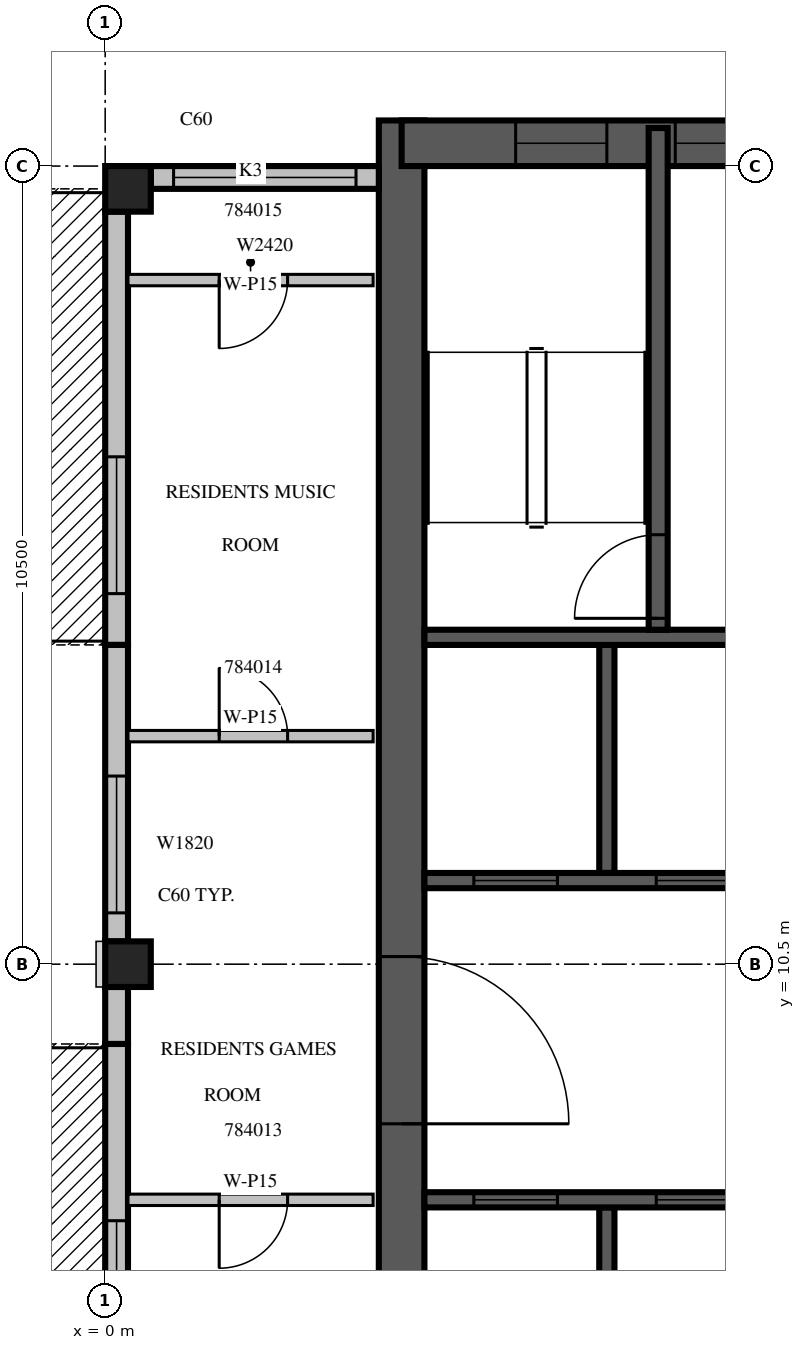
"""IFC4 building model, lengths in metres.
Left out: names, types, materials, properties, quantities, classifications, styles, units other than length and angle.
Written with IfcOpenShell. Run it as: python <this file> out.ifc"""

import sys

from ifc_helpers import new_model, si_unit, direction, frame, frame_2d, origin, origin_2d, place, context, subcontext, project, spatial, rectangle, extrude, source, transform, mapped, element, fill, save


model = new_model("IFC4")
c1 = context("Model", 3, precision=1e-05, world=origin(), true_north=direction((0.0, 1.0)))
c2 = subcontext(c1, "Body", "Model", "MODEL_VIEW")
j1 = project(units=[si_unit("LENGTHUNIT", "METRE"), si_unit("PLANEANGLEUNIT", "RADIAN")], contexts=[c1])
p1 = place(None, origin())
s1 = spatial("IfcSite", under=j1, at=p1, CompositionType="ELEMENT")
p2 = place(p1, origin())
s2 = spatial("IfcBuilding", under=s1, at=p2, CompositionType="ELEMENT")
p3 = place(p2, frame((0.0, 0.0, 354.5)))
s3 = spatial("IfcBuildingStorey", under=s2, at=p3, CompositionType="ELEMENT", Elevation=354.5)
m1 = source(origin(), c2, "Body", "SweptSolid", [
    extrude(rectangle(XDim=0.6, YDim=0.6, at=origin_2d()), origin(), (0.0, 0.0, 1.0), 3.5),
])
for number, where, z_axis, x_axis in (
    (1, (0.3, 10.5, 0.0), (0.0, 0.0, 1.0), (1.0, 0.0, 0.0)),
    (2, (0.3, 20.7, 0.0), (0.0, 0.0, 1.0), (1.0, 0.0, 0.0)),
):
    element("IfcColumn", number, at=place(p3, frame(where, z_axis=z_axis, x_axis=x_axis)), inside=s3, PredefinedType="COLUMN", context=c2, shape_type="MappedRepresentation", body=[
        mapped(m1, transform((0.0, 0.0, 0.0), scale=1.0)),
    ])
m2 = source(origin(), c2, "Body", "SweptSolid", [
    extrude(rectangle(XDim=17.4, YDim=0.6, at=frame_2d((8.7, 0.0))), origin(), (0.0, 0.0, 1.0), 3.5),
])
p4 = place(p3, frame((3.9, 4.2, 0.0), z_axis=(0.0, 0.0, 1.0), x_axis=(0.0, 1.0, 0.0)))
e3 = element("IfcWall", 3, at=p4, inside=s3, PredefinedType="SHEAR", context=c2, shape_type="MappedRepresentation", body=[
    mapped(m2, transform((0.0, 0.0, 0.0), scale=1.0)),
])
m3 = source(origin(), c2, "Body", "SweptSolid", [
    extrude(rectangle(XDim=2.2, YDim=2.1, at=frame_2d((1.1, 1.05))), frame((0.0, 0.31, 0.0), z_axis=(0.0, -1.0, 0.0), x_axis=(1.0, 0.0, 0.0)), (0.0, 0.0, 1.0), 0.62),
])
p5 = place(p4, frame((4.2, 0.0, 0.0)))
e4 = element("IfcOpeningElement", 4, at=p5, cuts=e3, PredefinedType="OPENING", context=c2, shape_type="MappedRepresentation", body=[
    mapped(m3, transform((0.0, 0.0, 0.0), scale=1.0)),
])
m4 = source(origin(), c2, "Body", "SweptSolid", [
    extrude(rectangle(XDim=6.6, YDim=0.6, at=frame_2d((3.3, 0.0))), origin(), (0.0, 0.0, 1.0), 3.5),
])
p6 = place(p3, frame((3.9, 21.3, 0.0), z_axis=(0.0, 0.0, 1.0), x_axis=(1.0, 0.0, 0.0)))
e5 = element("IfcWall", 5, at=p6, inside=s3, PredefinedType="SHEAR", context=c2, shape_type="MappedRepresentation", body=[
    mapped(m4, transform((0.0, 0.0, 0.0), scale=1.0)),
])
m5 = source(origin(), c2, "Body", "SweptSolid", [
    extrude(rectangle(XDim=1.2, YDim=2.4, at=frame_2d((0.6, 1.2))), frame((0.0, 0.31, 0.0), z_axis=(0.0, -1.0, 0.0), x_axis=(1.0, 0.0, 0.0)), (0.0, 0.0, 1.0), 0.62),
])
p7 = place(p6, frame((1.5, 0.0, 0.6)))
e6 = element("IfcOpeningElement", 6, at=p7, cuts=e5, PredefinedType="OPENING", context=c2, shape_type="MappedRepresentation", body=[
    mapped(m5, transform((0.0, 0.0, 0.0), scale=1.0)),
])
p8 = place(p6, frame((3.6, 0.0, 0.6)))
e7 = element("IfcOpeningElement", 7, at=p8, cuts=e5, PredefinedType="OPENING", context=c2, shape_type="MappedRepresentation", body=[
    mapped(m5, transform((0.0, 0.0, 0.0), scale=1.0)),
])
m6 = source(origin(), c2, "Body", "SweptSolid", [
    extrude(rectangle(XDim=3.0, YDim=0.3, at=frame_2d((1.5, 0.0))), origin(), (0.0, 0.0, 1.0), 3.1),
])
p9 = place(p3, frame((3.6, 20.85, 0.0), z_axis=(0.0, 0.0, 1.0), x_axis=(-1.0, 0.0, 0.0)))
e8 = element("IfcWall", 8, at=p9, inside=s3, PredefinedType="STANDARD", context=c2, shape_type="MappedRepresentation", body=[
    mapped(m6, transform((0.0, 0.0, 0.0), scale=1.0)),
])
m7 = source(origin(), c2, "Body", "SweptSolid", [
    extrude(rectangle(XDim=2.4, YDim=2.0, at=frame_2d((1.2, 1.0))), frame((0.0, 0.16, 0.0), z_axis=(0.0, -1.0, 0.0), x_axis=(1.0, 0.0, 0.0)), (0.0, 0.0, 1.0), 0.32),
])
p10 = place(p9, frame((0.3, 0.0, 0.6)))
e9 = element("IfcOpeningElement", 9, at=p10, cuts=e8, PredefinedType="OPENING", context=c2, shape_type="MappedRepresentation", body=[
    mapped(m7, transform((0.0, 0.0, 0.0), scale=1.0)),
])
m8 = source(origin(), c2, "Body", "SweptSolid", [
    extrude(rectangle(XDim=5.7, YDim=0.3, at=frame_2d((2.85, 0.0))), origin(), (0.0, 0.0, 1.0), 3.1),
])
p11 = place(p3, frame((0.15, 20.4, 0.0), z_axis=(0.0, 0.0, 1.0), x_axis=(0.0, -1.0, 0.0)))
e10 = element("IfcWall", 10, at=p11, inside=s3, PredefinedType="STANDARD", context=c2, shape_type="MappedRepresentation", body=[
    mapped(m8, transform((0.0, 0.0, 0.0), scale=1.0)),
])
m9 = source(origin(), c2, "Body", "SweptSolid", [
    extrude(rectangle(XDim=1.8, YDim=2.4, at=frame_2d((0.9, 1.2))), frame((0.0, 0.16, 0.0), z_axis=(0.0, -1.0, 0.0), x_axis=(1.0, 0.0, 0.0)), (0.0, 0.0, 1.0), 0.32),
])
p12 = place(p11, frame((3.225, 0.0, 0.0)))
e11 = element("IfcOpeningElement", 11, at=p12, cuts=e10, PredefinedType="OPENING", context=c2, shape_type="MappedRepresentation", body=[
    mapped(m9, transform((0.0, 0.0, 0.0), scale=1.0)),
])
m10 = source(origin(), c2, "Body", "SweptSolid", [
    extrude(rectangle(XDim=3.9, YDim=0.3, at=frame_2d((1.95, 0.0))), origin(), (0.0, 0.0, 1.0), 3.1),
])
p13 = place(p3, frame((0.15, 14.7, 0.0), z_axis=(0.0, 0.0, 1.0), x_axis=(0.0, -1.0, 0.0)))
e12 = element("IfcWall", 12, at=p13, inside=s3, PredefinedType="STANDARD", context=c2, shape_type="MappedRepresentation", body=[
    mapped(m10, transform((0.0, 0.0, 0.0), scale=1.0)),
])
m11 = source(origin(), c2, "Body", "SweptSolid", [
    extrude(rectangle(XDim=1.8, YDim=2.0, at=frame_2d((0.9, 1.0))), frame((0.0, 0.16, 0.0), z_axis=(0.0, -1.0, 0.0), x_axis=(1.0, 0.0, 0.0)), (0.0, 0.0, 1.0), 0.32),
])
p14 = place(p13, frame((1.725, 0.0, 0.6)))
e13 = element("IfcOpeningElement", 13, at=p14, cuts=e12, PredefinedType="OPENING", context=c2, shape_type="MappedRepresentation", body=[
    mapped(m11, transform((0.0, 0.0, 0.0), scale=1.0)),
])
m12 = source(origin(), c2, "Body", "SweptSolid", [
    extrude(rectangle(XDim=0.75, YDim=0.3, at=frame_2d((0.375, 0.0))), origin(), (0.0, 0.0, 1.0), 3.1),
])
p15 = place(p3, frame((0.15, 10.2, 0.0), z_axis=(0.0, 0.0, 1.0), x_axis=(0.0, -1.0, 0.0)))
e14 = element("IfcWall", 14, at=p15, inside=s3, PredefinedType="STANDARD", context=c2, shape_type="MappedRepresentation", body=[
    mapped(m12, transform((0.0, 0.0, 0.0), scale=1.0)),
])
m13 = source(origin(), c2, "Body", "SweptSolid", [
    extrude(rectangle(XDim=5.25, YDim=0.3, at=frame_2d((2.625, 0.0))), origin(), (0.0, 0.0, 1.0), 3.1),
])
p16 = place(p3, frame((0.15, 9.45, 0.0), z_axis=(0.0, 0.0, 1.0), x_axis=(0.0, -1.0, 0.0)))
e15 = element("IfcWall", 15, at=p16, inside=s3, PredefinedType="STANDARD", context=c2, shape_type="MappedRepresentation", body=[
    mapped(m13, transform((0.0, 0.0, 0.0), scale=1.0)),
])
p17 = place(p16, frame((2.325, 0.0, 0.0)))
e16 = element("IfcOpeningElement", 16, at=p17, cuts=e15, PredefinedType="OPENING", context=c2, shape_type="MappedRepresentation", body=[
    mapped(m9, transform((0.0, 0.0, 0.0), scale=1.0)),
])
m14 = source(origin(), c2, "Body", "SweptSolid", [
    extrude(rectangle(XDim=3.1, YDim=0.2, at=frame_2d((1.55, 0.0))), origin(), (0.0, 0.0, 1.0), 3.5),
])
p18 = place(p3, frame((6.6, 4.2, 0.0), z_axis=(0.0, 0.0, 1.0), x_axis=(0.0, 1.0, 0.0)))
e17 = element("IfcWall", 17, at=p18, inside=s3, PredefinedType="SOLIDWALL", context=c2, shape_type="MappedRepresentation", body=[
    mapped(m14, transform((0.0, 0.0, 0.0), scale=1.0)),
])
m15 = source(origin(), c2, "Body", "SweptSolid", [
    extrude(rectangle(XDim=3.0, YDim=0.2, at=frame_2d((1.5, 0.0))), origin(), (0.0, 0.0, 1.0), 3.5),
])
p19 = place(p3, frame((6.6, 11.7, 0.0), z_axis=(0.0, 0.0, 1.0), x_axis=(0.0, 1.0, 0.0)))
e18 = element("IfcWall", 18, at=p19, inside=s3, PredefinedType="SOLIDWALL", context=c2, shape_type="MappedRepresentation", body=[
    mapped(m15, transform((0.0, 0.0, 0.0), scale=1.0)),
])
m16 = source(origin(), c2, "Body", "SweptSolid", [
    extrude(rectangle(XDim=9.6, YDim=0.2, at=frame_2d((4.8, 0.0))), origin(), (0.0, 0.0, 1.0), 3.5),
])
p20 = place(p3, frame((4.2, 7.4, 0.0), z_axis=(0.0, 0.0, 1.0), x_axis=(1.0, 0.0, 0.0)))
e19 = element("IfcWall", 19, at=p20, inside=s3, PredefinedType="SOLIDWALL", context=c2, shape_type="MappedRepresentation", body=[
    mapped(m16, transform((0.0, 0.0, 0.0), scale=1.0)),
])
m17 = source(origin(), c2, "Body", "SweptSolid", [
    extrude(rectangle(XDim=1.1, YDim=2.1, at=frame_2d((0.55, 1.05))), frame((0.0, 0.11, 0.0), z_axis=(0.0, -1.0, 0.0), x_axis=(1.0, 0.0, 0.0)), (0.0, 0.0, 1.0), 0.22),
])
p21 = place(p20, frame((0.65, 0.0, 0.0)))
e20 = element("IfcOpeningElement", 20, at=p21, cuts=e19, PredefinedType="OPENING", context=c2, shape_type="MappedRepresentation", body=[
    mapped(m17, transform((0.0, 0.0, 0.0), scale=1.0)),
])
p22 = place(p20, frame((3.05, 0.0, 0.0)))
e21 = element("IfcOpeningElement", 21, at=p22, cuts=e19, PredefinedType="OPENING", context=c2, shape_type="MappedRepresentation", body=[
    mapped(m17, transform((0.0, 0.0, 0.0), scale=1.0)),
])
p23 = place(p20, frame((5.45, 0.0, 0.0)))
e22 = element("IfcOpeningElement", 22, at=p23, cuts=e19, PredefinedType="OPENING", context=c2, shape_type="MappedRepresentation", body=[
    mapped(m17, transform((0.0, 0.0, 0.0), scale=1.0)),
])
p24 = place(p20, frame((7.85, 0.0, 0.0)))
e23 = element("IfcOpeningElement", 23, at=p24, cuts=e19, PredefinedType="OPENING", context=c2, shape_type="MappedRepresentation", body=[
    mapped(m17, transform((0.0, 0.0, 0.0), scale=1.0)),
])
m18 = source(origin(), c2, "Body", "SweptSolid", [
    extrude(rectangle(XDim=4.8, YDim=0.2, at=frame_2d((2.4, 0.0))), origin(), (0.0, 0.0, 1.0), 3.5),
])
p25 = place(p3, frame((4.2, 11.6, 0.0), z_axis=(0.0, 0.0, 1.0), x_axis=(1.0, 0.0, 0.0)))
e24 = element("IfcWall", 24, at=p25, inside=s3, PredefinedType="SOLIDWALL", context=c2, shape_type="MappedRepresentation", body=[
    mapped(m18, transform((0.0, 0.0, 0.0), scale=1.0)),
])
p26 = place(p25, frame((0.65, 0.0, 0.0)))
e25 = element("IfcOpeningElement", 25, at=p26, cuts=e24, PredefinedType="OPENING", context=c2, shape_type="MappedRepresentation", body=[
    mapped(m17, transform((0.0, 0.0, 0.0), scale=1.0)),
])
p27 = place(p25, frame((3.05, 0.0, 0.0)))
e26 = element("IfcOpeningElement", 26, at=p27, cuts=e24, PredefinedType="OPENING", context=c2, shape_type="MappedRepresentation", body=[
    mapped(m17, transform((0.0, 0.0, 0.0), scale=1.0)),
])
p28 = place(p3, frame((4.2, 14.8, 0.0), z_axis=(0.0, 0.0, 1.0), x_axis=(1.0, 0.0, 0.0)))
e27 = element("IfcWall", 27, at=p28, inside=s3, PredefinedType="SOLIDWALL", context=c2, shape_type="MappedRepresentation", body=[
    mapped(m18, transform((0.0, 0.0, 0.0), scale=1.0)),
])
m19 = source(origin(), c2, "Body", "SweptSolid", [
    extrude(rectangle(XDim=6.6, YDim=0.25, at=frame_2d((3.3, 0.0))), origin(), (0.0, 0.0, 1.0), 3.1),
])
p29 = place(p3, frame((7.275, 14.9, 0.0), z_axis=(0.0, 0.0, 1.0), x_axis=(0.0, 1.0, 0.0)))
e28 = element("IfcWall", 28, at=p29, inside=s3, PredefinedType="SOLIDWALL", context=c2, shape_type="MappedRepresentation", body=[
    mapped(m19, transform((0.0, 0.0, 0.0), scale=1.0)),
])
m20 = source(origin(), c2, "Body", "SweptSolid", [
    extrude(rectangle(XDim=1.1, YDim=2.1, at=frame_2d((0.55, 1.05))), frame((0.0, 0.135, 0.0), z_axis=(0.0, -1.0, 0.0), x_axis=(1.0, 0.0, 0.0)), (0.0, 0.0, 1.0), 0.27),
])
p30 = place(p29, frame((0.15, 0.0, 0.0)))
e29 = element("IfcOpeningElement", 29, at=p30, cuts=e28, PredefinedType="OPENING", context=c2, shape_type="MappedRepresentation", body=[
    mapped(m20, transform((0.0, 0.0, 0.0), scale=1.0)),
])
m21 = source(origin(), c2, "Body", "SweptSolid", [
    extrude(rectangle(XDim=3.225, YDim=0.15, at=frame_2d((1.613, 0.0))), origin(), (0.0, 0.0, 1.0), 3.1),
])
p31 = place(p3, frame((0.3, 7.4, 0.0), z_axis=(0.0, 0.0, 1.0), x_axis=(1.0, 0.0, 0.0)))
e30 = element("IfcWall", 30, at=p31, inside=s3, PredefinedType="PARTITIONING", context=c2, shape_type="MappedRepresentation", body=[
    mapped(m21, transform((0.0, 0.0, 0.0), scale=1.0)),
])
m22 = source(origin(), c2, "Body", "SweptSolid", [
    extrude(rectangle(XDim=0.9, YDim=2.1, at=frame_2d((0.45, 1.05))), frame((0.0, 0.085, 0.0), z_axis=(0.0, -1.0, 0.0), x_axis=(1.0, 0.0, 0.0)), (0.0, 0.0, 1.0), 0.17),
])
p32 = place(p31, frame((1.2, 0.0, 0.0)))
e31 = element("IfcOpeningElement", 31, at=p32, cuts=e30, PredefinedType="OPENING", context=c2, shape_type="MappedRepresentation", body=[
    mapped(m22, transform((0.0, 0.0, 0.0), scale=1.0)),
])
p33 = place(p3, frame((0.3, 13.5, 0.0), z_axis=(0.0, 0.0, 1.0), x_axis=(1.0, 0.0, 0.0)))
e32 = element("IfcWall", 32, at=p33, inside=s3, PredefinedType="PARTITIONING", context=c2, shape_type="MappedRepresentation", body=[
    mapped(m21, transform((0.0, 0.0, 0.0), scale=1.0)),
])
p34 = place(p33, frame((1.2, 0.0, 0.0)))
e33 = element("IfcOpeningElement", 33, at=p34, cuts=e32, PredefinedType="OPENING", context=c2, shape_type="MappedRepresentation", body=[
    mapped(m22, transform((0.0, 0.0, 0.0), scale=1.0)),
])
p35 = place(p3, frame((0.3, 19.5, 0.0), z_axis=(0.0, 0.0, 1.0), x_axis=(1.0, 0.0, 0.0)))
e34 = element("IfcWall", 34, at=p35, inside=s3, PredefinedType="PARTITIONING", context=c2, shape_type="MappedRepresentation", body=[
    mapped(m21, transform((0.0, 0.0, 0.0), scale=1.0)),
])
p36 = place(p35, frame((1.2, 0.0, 0.0)))
e35 = element("IfcOpeningElement", 35, at=p36, cuts=e34, PredefinedType="OPENING", context=c2, shape_type="MappedRepresentation", body=[
    mapped(m22, transform((0.0, 0.0, 0.0), scale=1.0)),
])
m23 = source(origin(), c2, "Body", "SweptSolid", [
    extrude(rectangle(XDim=2.4, YDim=2.0, at=frame_2d((1.2, 1.0))), frame((0.0, 0.03, 0.0), z_axis=(0.0, -1.0, 0.0), x_axis=(1.0, 0.0, 0.0)), (0.0, 0.0, 1.0), 0.06),
])
p37 = place(p10, origin())
e36 = element("IfcWindow", 36, at=p37, inside=s3, PartitioningType="SINGLE_PANEL", PredefinedType="WINDOW", context=c2, shape_type="MappedRepresentation", body=[
    mapped(m23, transform((0.0, 0.0, 0.0), scale=1.0)),
])
fill(e9, e36)
m24 = source(origin(), c2, "Body", "SweptSolid", [
    extrude(rectangle(XDim=1.8, YDim=2.4, at=frame_2d((0.9, 1.2))), frame((0.0, 0.025, 0.0), z_axis=(0.0, -1.0, 0.0), x_axis=(1.0, 0.0, 0.0)), (0.0, 0.0, 1.0), 0.05),
])
p38 = place(p12, origin())
e37 = element("IfcDoor", 37, at=p38, inside=s3, OperationType="SLIDING_TO_LEFT", PredefinedType="DOOR", context=c2, shape_type="MappedRepresentation", body=[
    mapped(m24, transform((0.0, 0.0, 0.0), scale=1.0)),
])
fill(e11, e37)
m25 = source(origin(), c2, "Body", "SweptSolid", [
    extrude(rectangle(XDim=1.8, YDim=2.0, at=frame_2d((0.9, 1.0))), frame((0.0, 0.03, 0.0), z_axis=(0.0, -1.0, 0.0), x_axis=(1.0, 0.0, 0.0)), (0.0, 0.0, 1.0), 0.06),
])
p39 = place(p14, origin())
e38 = element("IfcWindow", 38, at=p39, inside=s3, PartitioningType="SINGLE_PANEL", PredefinedType="WINDOW", context=c2, shape_type="MappedRepresentation", body=[
    mapped(m25, transform((0.0, 0.0, 0.0), scale=1.0)),
])
fill(e13, e38)
p40 = place(p17, origin())
e39 = element("IfcDoor", 39, at=p40, inside=s3, OperationType="SLIDING_TO_LEFT", PredefinedType="DOOR", context=c2, shape_type="MappedRepresentation", body=[
    mapped(m24, transform((0.0, 0.0, 0.0), scale=1.0)),
])
fill(e16, e39)
m26 = source(origin(), c2, "Body", "SweptSolid", [
    extrude(rectangle(XDim=1.1, YDim=2.1, at=frame_2d((0.55, 1.05))), frame((0.0, 0.025, 0.0), z_axis=(0.0, -1.0, 0.0), x_axis=(1.0, 0.0, 0.0)), (0.0, 0.0, 1.0), 0.05),
])
p41 = place(p21, origin())
e40 = element("IfcDoor", 40, at=p41, inside=s3, OperationType="SLIDING_TO_LEFT", PredefinedType="DOOR", context=c2, shape_type="MappedRepresentation", body=[
    mapped(m26, transform((0.0, 0.0, 0.0), scale=1.0)),
])
fill(e20, e40)
p42 = place(p22, origin())
e41 = element("IfcDoor", 41, at=p42, inside=s3, OperationType="SLIDING_TO_LEFT", PredefinedType="DOOR", context=c2, shape_type="MappedRepresentation", body=[
    mapped(m26, transform((0.0, 0.0, 0.0), scale=1.0)),
])
fill(e21, e41)
p43 = place(p26, origin())
e42 = element("IfcDoor", 42, at=p43, inside=s3, OperationType="SLIDING_TO_LEFT", PredefinedType="DOOR", context=c2, shape_type="MappedRepresentation", body=[
    mapped(m26, transform((0.0, 0.0, 0.0), scale=1.0)),
])
fill(e25, e42)
p44 = place(p27, origin())
e43 = element("IfcDoor", 43, at=p44, inside=s3, OperationType="SLIDING_TO_LEFT", PredefinedType="DOOR", context=c2, shape_type="MappedRepresentation", body=[
    mapped(m26, transform((0.0, 0.0, 0.0), scale=1.0)),
])
fill(e26, e43)
p45 = place(p30, origin())
e44 = element("IfcDoor", 44, at=p45, inside=s3, OperationType="SINGLE_SWING_LEFT", PredefinedType="DOOR", context=c2, shape_type="MappedRepresentation", body=[
    mapped(m26, transform((0.0, 0.0, 0.0), scale=1.0)),
])
fill(e29, e44)
m27 = source(origin(), c2, "Body", "SweptSolid", [
    extrude(rectangle(XDim=2.2, YDim=2.1, at=frame_2d((1.1, 1.05))), frame((0.0, 0.025, 0.0), z_axis=(0.0, -1.0, 0.0), x_axis=(1.0, 0.0, 0.0)), (0.0, 0.0, 1.0), 0.05),
])
p46 = place(p5, origin())
e45 = element("IfcDoor", 45, at=p46, inside=s3, OperationType="DOUBLE_DOOR_SINGLE_SWING", PredefinedType="DOOR", context=c2, shape_type="MappedRepresentation", body=[
    mapped(m27, transform((0.0, 0.0, 0.0), scale=1.0)),
])
fill(e4, e45)
m28 = source(origin(), c2, "Body", "SweptSolid", [
    extrude(rectangle(XDim=1.2, YDim=2.4, at=frame_2d((0.6, 1.2))), frame((0.0, 0.03, 0.0), z_axis=(0.0, -1.0, 0.0), x_axis=(1.0, 0.0, 0.0)), (0.0, 0.0, 1.0), 0.06),
])
p47 = place(p7, origin())
e46 = element("IfcWindow", 46, at=p47, inside=s3, PartitioningType="SINGLE_PANEL", PredefinedType="WINDOW", context=c2, shape_type="MappedRepresentation", body=[
    mapped(m28, transform((0.0, 0.0, 0.0), scale=1.0)),
])
fill(e6, e46)
p48 = place(p8, origin())
e47 = element("IfcWindow", 47, at=p48, inside=s3, PartitioningType="SINGLE_PANEL", PredefinedType="WINDOW", context=c2, shape_type="MappedRepresentation", body=[
    mapped(m28, transform((0.0, 0.0, 0.0), scale=1.0)),
])
fill(e7, e47)
m29 = source(origin(), c2, "Body", "SweptSolid", [
    extrude(rectangle(XDim=0.9, YDim=2.1, at=frame_2d((0.45, 1.05))), frame((0.0, 0.025, 0.0), z_axis=(0.0, -1.0, 0.0), x_axis=(1.0, 0.0, 0.0)), (0.0, 0.0, 1.0), 0.05),
])
p49 = place(p32, origin())
e48 = element("IfcDoor", 48, at=p49, inside=s3, OperationType="SINGLE_SWING_RIGHT", PredefinedType="DOOR", context=c2, shape_type="MappedRepresentation", body=[
    mapped(m29, transform((0.0, 0.0, 0.0), scale=1.0)),
])
fill(e31, e48)
p50 = place(p34, origin())
e49 = element("IfcDoor", 49, at=p50, inside=s3, OperationType="SINGLE_SWING_LEFT", PredefinedType="DOOR", context=c2, shape_type="MappedRepresentation", body=[
    mapped(m29, transform((0.0, 0.0, 0.0), scale=1.0)),
])
fill(e33, e49)
p51 = place(p36, origin())
e50 = element("IfcDoor", 50, at=p51, inside=s3, OperationType="SINGLE_SWING_RIGHT", PredefinedType="DOOR", context=c2, shape_type="MappedRepresentation", body=[
    mapped(m29, transform((0.0, 0.0, 0.0), scale=1.0)),
])
fill(e35, e50)
save(model, sys.argv[1])
